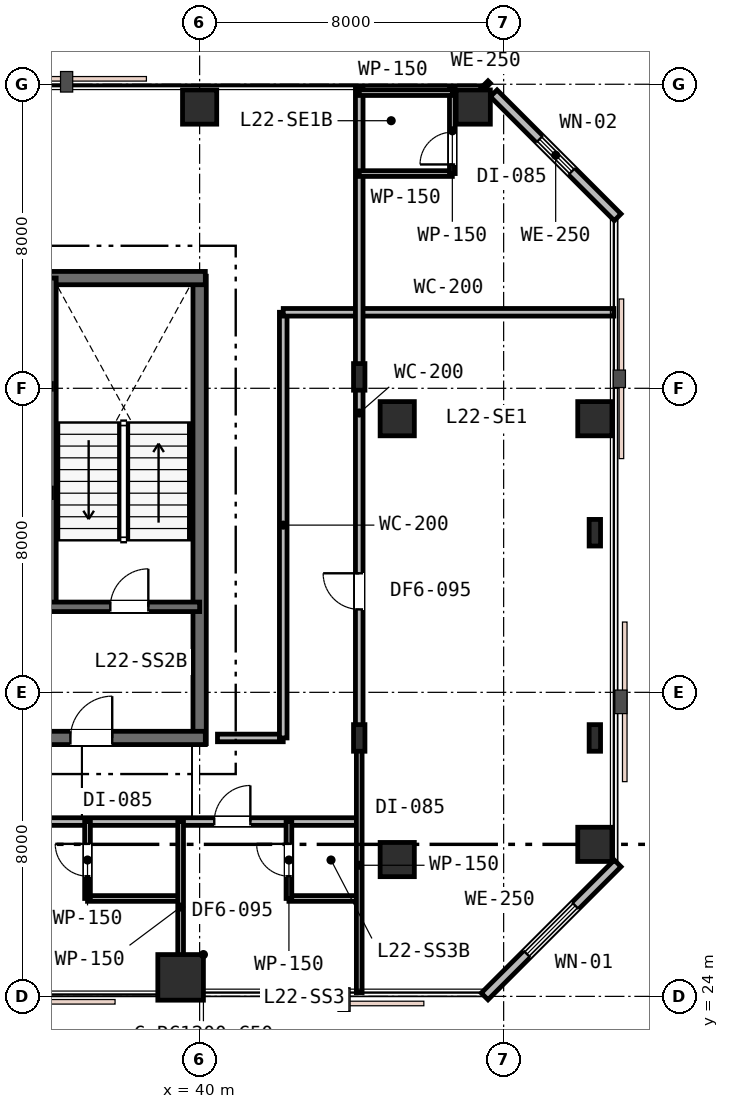
"""IFC4 building model, lengths in metres.
Left out: names, types, materials, properties, quantities, classifications, styles, units other than length and angle.
Written with IfcOpenShell. Run it as: python <this file> out.ifc"""

import sys

from ifc_helpers import new_model, si_unit, direction, frame, frame_2d, origin, origin_2d, place, context, subcontext, project, spatial, rectangle, i_section, extrude, element, fill, save


model = new_model("IFC4")
c1 = context("Model", 3, precision=1e-05, world=origin(), true_north=direction((0.0, 1.0)))
c2 = subcontext(c1, "Body", "Model", "MODEL_VIEW")
j1 = project(units=[si_unit("LENGTHUNIT", "METRE"), si_unit("PLANEANGLEUNIT", "RADIAN")], contexts=[c1])
p1 = place(None, origin())
s1 = spatial("IfcSite", under=j1, at=p1, CompositionType="ELEMENT")
p2 = place(p1, origin())
s2 = spatial("IfcBuilding", under=s1, at=p2, CompositionType="ELEMENT")
p3 = place(p2, frame((0.0, 0.0, 90.0)))
s3 = spatial("IfcBuildingStorey", under=s2, at=p3, CompositionType="ELEMENT", Elevation=90.0)
p4 = place(p3, frame((40.0, 30.65, 0.0), z_axis=(0.0, 0.0, 1.0), x_axis=(0.0, 1.0, 0.0)))
e1 = element("IfcWall", 1, at=p4, inside=s3, PredefinedType="SHEAR", context=c2, shape_type="SweptSolid", body=[
    extrude(rectangle(XDim=12.3, YDim=0.35, at=frame_2d((6.15, 0.0))), origin(), (0.0, 0.0, 1.0), 3.6),
])
p5 = place(p3, frame((15.85, 42.9, 0.0), z_axis=(0.0, 0.0, 1.0), x_axis=(1.0, 0.0, 0.0)))
e2 = element("IfcWall", 2, at=p5, inside=s3, PredefinedType="SHEAR", context=c2, shape_type="SweptSolid", body=[
    extrude(rectangle(XDim=24.3, YDim=0.35, at=frame_2d((12.15, 0.0))), origin(), (0.0, 0.0, 1.0), 3.6),
])
p6 = place(p3, frame((28.95, 30.8, 0.0), z_axis=(0.0, 0.0, 1.0), x_axis=(1.0, 0.0, 0.0)))
e3 = element("IfcWall", 3, at=p6, inside=s3, PredefinedType="SHEAR", context=c2, shape_type="SweptSolid", body=[
    extrude(rectangle(XDim=11.2, YDim=0.35, at=frame_2d((5.6, 0.0))), origin(), (0.0, 0.0, 1.0), 3.6),
])
p7 = place(p6, frame((7.65, 0.0, 0.0)))
e4 = element("IfcOpeningElement", 4, at=p7, cuts=e3, PredefinedType="OPENING", context=c2, shape_type="SweptSolid", body=[
    extrude(rectangle(XDim=1.1, YDim=2.15, at=frame_2d((0.55, 1.075))), frame((0.0, 0.185, 0.0), z_axis=(0.0, -1.0, 0.0), x_axis=(1.0, 0.0, 0.0)), (0.0, 0.0, 1.0), 0.37),
])
p8 = place(p3, frame((36.1, 34.25, 0.0), z_axis=(0.0, 0.0, 1.0), x_axis=(0.0, 1.0, 0.0)))
e5 = element("IfcWall", 5, at=p8, inside=s3, PredefinedType="SHEAR", context=c2, shape_type="SweptSolid", body=[
    extrude(rectangle(XDim=8.65, YDim=0.25, at=frame_2d((4.325, 0.0))), origin(), (0.0, 0.0, 1.0), 3.6),
])
p9 = place(p3, frame((33.95, 34.25, 0.0), z_axis=(0.0, 0.0, 1.0), x_axis=(1.0, 0.0, 0.0)))
e6 = element("IfcWall", 6, at=p9, inside=s3, PredefinedType="SHEAR", context=c2, shape_type="SweptSolid", body=[
    extrude(rectangle(XDim=6.05, YDim=0.25, at=frame_2d((3.025, 0.0))), origin(), (0.0, 0.0, 1.0), 3.6),
])
p10 = place(p9, frame((3.7, 0.0, 0.0)))
e7 = element("IfcOpeningElement", 7, at=p10, cuts=e6, PredefinedType="OPENING", context=c2, shape_type="SweptSolid", body=[
    extrude(rectangle(XDim=1.0, YDim=2.15, at=frame_2d((0.5, 1.075))), frame((0.0, 0.135, 0.0), z_axis=(0.0, -1.0, 0.0), x_axis=(1.0, 0.0, 0.0)), (0.0, 0.0, 1.0), 0.27),
])
p11 = place(p9, frame((0.55, 0.0, 0.0)))
e8 = element("IfcOpeningElement", 8, at=p11, cuts=e6, PredefinedType="OPENING", context=c2, shape_type="SweptSolid", body=[
    extrude(rectangle(XDim=1.1, YDim=2.15, at=frame_2d((0.55, 1.075))), frame((0.0, 0.135, 0.0), z_axis=(0.0, -1.0, 0.0), x_axis=(1.0, 0.0, 0.0)), (0.0, 0.0, 1.0), 0.27),
])
p12 = place(p3, frame((39.5, 24.5, 0.0), z_axis=(0.0, 0.0, 1.0), x_axis=(1.0, 0.0, 0.0)))
e9 = element("IfcColumn", 9, at=p12, inside=s3, PredefinedType="COLUMN", context=c2, shape_type="SweptSolid", body=[
    extrude(rectangle(XDim=1.2, YDim=1.2, at=origin_2d()), origin(), (0.0, 0.0, 1.0), 3.6),
])
for number, where, z_axis, x_axis in (
    (10, (45.2, 27.6, 0.0), (0.0, 0.0, 1.0), (1.0, 0.0, 0.0)),
    (11, (45.2, 39.2, 0.0), (0.0, 0.0, 1.0), (1.0, 0.0, 0.0)),
    (12, (40.0, 47.4, 0.0), (0.0, 0.0, 1.0), (1.0, 0.0, 0.0)),
    (13, (47.2, 47.4, 0.0), (0.0, 0.0, 1.0), (1.0, 0.0, 0.0)),
    (14, (50.4, 28.0, 0.0), (0.0, 0.0, 1.0), (1.0, 0.0, 0.0)),
    (15, (50.4, 39.2, 0.0), (0.0, 0.0, 1.0), (1.0, 0.0, 0.0)),
):
    element("IfcColumn", number, at=place(p3, frame(where, z_axis=z_axis, x_axis=x_axis)), inside=s3, PredefinedType="COLUMN", context=c2, shape_type="SweptSolid", body=[
        extrude(rectangle(XDim=0.9, YDim=0.9, at=origin_2d()), origin(), (0.0, 0.0, 1.0), 3.6),
    ])
for number, where, z_axis, x_axis in (
    (16, (44.2, 30.8, 0.0), (0.0, 0.0, 1.0), (1.0, 0.0, 0.0)),
    (17, (44.2, 40.3, 0.0), (0.0, 0.0, 1.0), (1.0, 0.0, 0.0)),
    (18, (50.4, 30.8, 0.0), (0.0, 0.0, 1.0), (1.0, 0.0, 0.0)),
    (19, (50.4, 36.2, 0.0), (0.0, 0.0, 1.0), (1.0, 0.0, 0.0)),
):
    element("IfcColumn", number, at=place(p3, frame(where, z_axis=z_axis, x_axis=x_axis)), inside=s3, PredefinedType="COLUMN", context=c2, shape_type="SweptSolid", body=[
        extrude(i_section(OverallWidth=0.3, OverallDepth=0.7, WebThickness=0.017, FlangeThickness=0.032, FilletRadius=0.027, at=origin_2d()), origin(), (0.0, 0.0, 1.0), 3.6),
    ])
p13 = place(p3, frame((47.5, 24.0, 0.0), z_axis=(0.0, 0.0, 1.0), x_axis=(0.707106781187, 0.707106781187, 0.0)))
e20 = element("IfcWall", 20, at=p13, inside=s3, PredefinedType="STANDARD", context=c2, shape_type="SweptSolid", body=[
    extrude(rectangle(XDim=4.95, YDim=0.25, at=frame_2d((2.475, 0.0))), origin(), (0.0, 0.0, 1.0), 3.33),
])
p14 = place(p13, frame((1.575, 0.0, 0.75)))
e21 = element("IfcOpeningElement", 21, at=p14, cuts=e20, PredefinedType="OPENING", context=c2, shape_type="SweptSolid", body=[
    extrude(rectangle(XDim=1.8, YDim=1.85, at=frame_2d((0.9, 0.925))), frame((0.0, 0.135, 0.0), z_axis=(0.0, -1.0, 0.0), x_axis=(1.0, 0.0, 0.0)), (0.0, 0.0, 1.0), 0.27),
])
p15 = place(p3, frame((51.0, 44.5, 0.0), z_axis=(0.0, 0.0, 1.0), x_axis=(-0.707106781187, 0.707106781187, 0.0)))
e22 = element("IfcWall", 22, at=p15, inside=s3, PredefinedType="STANDARD", context=c2, shape_type="SweptSolid", body=[
    extrude(rectangle(XDim=4.613, YDim=0.25, at=frame_2d((2.306, 0.0))), origin(), (0.0, 0.0, 1.0), 3.33),
])
p16 = place(p15, frame((1.706, 0.0, 0.85)))
e23 = element("IfcOpeningElement", 23, at=p16, cuts=e22, PredefinedType="OPENING", context=c2, shape_type="SweptSolid", body=[
    extrude(rectangle(XDim=1.2, YDim=1.6, at=frame_2d((0.6, 0.8))), frame((0.0, 0.135, 0.0), z_axis=(0.0, -1.0, 0.0), x_axis=(1.0, 0.0, 0.0)), (0.0, 0.0, 1.0), 0.27),
])
p17 = place(p3, frame((47.562, 47.938, 0.0), z_axis=(0.0, 0.0, 1.0), x_axis=(-0.707106781187, 0.707106781187, 0.0)))
e24 = element("IfcWall", 24, at=p17, inside=s3, PredefinedType="STANDARD", context=c2, shape_type="SweptSolid", body=[
    extrude(rectangle(XDim=0.087, YDim=0.25, at=frame_2d((0.044, 0.0))), origin(), (0.0, 0.0, 1.0), 3.33),
])
p18 = place(p3, frame((11.4, 28.6, 0.0), z_axis=(0.0, 0.0, 1.0), x_axis=(1.0, 0.0, 0.0)))
e25 = element("IfcWall", 25, at=p18, inside=s3, PredefinedType="PARTITIONING", context=c2, shape_type="SweptSolid", body=[
    extrude(rectangle(XDim=32.8, YDim=0.2, at=frame_2d((16.4, 0.0))), origin(), (0.0, 0.0, 1.0), 2.83),
])
p19 = place(p18, frame((14.7, 0.0, 0.0)))
e26 = element("IfcOpeningElement", 26, at=p19, cuts=e25, PredefinedType="OPENING", context=c2, shape_type="SweptSolid", body=[
    extrude(rectangle(XDim=0.95, YDim=2.15, at=frame_2d((0.475, 1.075))), frame((0.0, 0.11, 0.0), z_axis=(0.0, -1.0, 0.0), x_axis=(1.0, 0.0, 0.0)), (0.0, 0.0, 1.0), 0.22),
])
p20 = place(p18, frame((22.475, 0.0, 0.0)))
e27 = element("IfcOpeningElement", 27, at=p20, cuts=e25, PredefinedType="OPENING", context=c2, shape_type="SweptSolid", body=[
    extrude(rectangle(XDim=0.95, YDim=2.15, at=frame_2d((0.475, 1.075))), frame((0.0, 0.11, 0.0), z_axis=(0.0, -1.0, 0.0), x_axis=(1.0, 0.0, 0.0)), (0.0, 0.0, 1.0), 0.22),
])
p21 = place(p18, frame((28.985, 0.0, 0.0)))
e28 = element("IfcOpeningElement", 28, at=p21, cuts=e25, PredefinedType="OPENING", context=c2, shape_type="SweptSolid", body=[
    extrude(rectangle(XDim=0.95, YDim=2.15, at=frame_2d((0.475, 1.075))), frame((0.0, 0.11, 0.0), z_axis=(0.0, -1.0, 0.0), x_axis=(1.0, 0.0, 0.0)), (0.0, 0.0, 1.0), 0.22),
])
p22 = place(p3, frame((40.47, 30.8, 0.0), z_axis=(0.0, 0.0, 1.0), x_axis=(1.0, 0.0, 0.0)))
e29 = element("IfcWall", 29, at=p22, inside=s3, PredefinedType="PARTITIONING", context=c2, shape_type="SweptSolid", body=[
    extrude(rectangle(XDim=1.73, YDim=0.2, at=frame_2d((0.865, 0.0))), origin(), (0.0, 0.0, 1.0), 2.83),
])
p23 = place(p3, frame((42.2, 30.8, 0.0), z_axis=(0.0, 0.0, 1.0), x_axis=(0.0, 1.0, 0.0)))
e30 = element("IfcWall", 30, at=p23, inside=s3, PredefinedType="PARTITIONING", context=c2, shape_type="SweptSolid", body=[
    extrude(rectangle(XDim=11.2, YDim=0.2, at=frame_2d((5.6, 0.0))), origin(), (0.0, 0.0, 1.0), 2.83),
])
p24 = place(p3, frame((42.2, 42.0, 0.0), z_axis=(0.0, 0.0, 1.0), x_axis=(1.0, 0.0, 0.0)))
e31 = element("IfcWall", 31, at=p24, inside=s3, PredefinedType="PARTITIONING", context=c2, shape_type="SweptSolid", body=[
    extrude(rectangle(XDim=8.7, YDim=0.2, at=frame_2d((4.35, 0.0))), origin(), (0.0, 0.0, 1.0), 3.33),
])
p25 = place(p3, frame((37.05, 26.576, 0.0), z_axis=(0.0, 0.0, 1.0), x_axis=(1.0, 0.0, 0.0)))
e32 = element("IfcWall", 32, at=p25, inside=s3, PredefinedType="PARTITIONING", context=c2, shape_type="SweptSolid", body=[
    extrude(rectangle(XDim=2.45, YDim=0.15, at=frame_2d((1.225, 0.0))), origin(), (0.0, 0.0, 1.0), 2.83),
])
p26 = place(p3, frame((37.05, 26.576, 0.0), z_axis=(0.0, 0.0, 1.0), x_axis=(0.0, 1.0, 0.0)))
e33 = element("IfcWall", 33, at=p26, inside=s3, PredefinedType="PARTITIONING", context=c2, shape_type="SweptSolid", body=[
    extrude(rectangle(XDim=2.024, YDim=0.15, at=frame_2d((1.012, 0.0))), origin(), (0.0, 0.0, 1.0), 3.02),
])
p27 = place(p26, frame((0.587, 0.0, 0.0)))
e34 = element("IfcOpeningElement", 34, at=p27, cuts=e33, PredefinedType="OPENING", context=c2, shape_type="SweptSolid", body=[
    extrude(rectangle(XDim=0.85, YDim=2.15, at=frame_2d((0.425, 1.075))), frame((0.0, 0.085, 0.0), z_axis=(0.0, -1.0, 0.0), x_axis=(1.0, 0.0, 0.0)), (0.0, 0.0, 1.0), 0.17),
])
p28 = place(p3, frame((39.5, 28.6, 0.0), z_axis=(0.0, 0.0, 1.0), x_axis=(0.0, -1.0, 0.0)))
e35 = element("IfcWall", 35, at=p28, inside=s3, PredefinedType="PARTITIONING", context=c2, shape_type="SweptSolid", body=[
    extrude(rectangle(XDim=4.5, YDim=0.15, at=frame_2d((2.25, 0.0))), origin(), (0.0, 0.0, 1.0), 2.83),
])
p29 = place(p3, frame((42.35, 26.576, 0.0), z_axis=(0.0, 0.0, 1.0), x_axis=(1.0, 0.0, 0.0)))
e36 = element("IfcWall", 36, at=p29, inside=s3, PredefinedType="PARTITIONING", context=c2, shape_type="SweptSolid", body=[
    extrude(rectangle(XDim=1.85, YDim=0.15, at=frame_2d((0.925, 0.0))), origin(), (0.0, 0.0, 1.0), 3.33),
])
p30 = place(p3, frame((42.35, 26.576, 0.0), z_axis=(0.0, 0.0, 1.0), x_axis=(0.0, 1.0, 0.0)))
e37 = element("IfcWall", 37, at=p30, inside=s3, PredefinedType="PARTITIONING", context=c2, shape_type="SweptSolid", body=[
    extrude(rectangle(XDim=2.024, YDim=0.15, at=frame_2d((1.012, 0.0))), origin(), (0.0, 0.0, 1.0), 3.33),
])
p31 = place(p30, frame((0.587, 0.0, 0.0)))
e38 = element("IfcOpeningElement", 38, at=p31, cuts=e37, PredefinedType="OPENING", context=c2, shape_type="SweptSolid", body=[
    extrude(rectangle(XDim=0.85, YDim=2.15, at=frame_2d((0.425, 1.075))), frame((0.0, 0.085, 0.0), z_axis=(0.0, -1.0, 0.0), x_axis=(1.0, 0.0, 0.0)), (0.0, 0.0, 1.0), 0.17),
])
p32 = place(p3, frame((44.2, 30.8, 0.0), z_axis=(0.0, 0.0, 1.0), x_axis=(0.0, -1.0, 0.0)))
e39 = element("IfcWall", 39, at=p32, inside=s3, PredefinedType="PARTITIONING", context=c2, shape_type="SweptSolid", body=[
    extrude(rectangle(XDim=6.7, YDim=0.15, at=frame_2d((3.35, 0.0))), origin(), (0.0, 0.0, 1.0), 2.83),
])
p33 = place(p3, frame((44.2, 30.8, 0.0), z_axis=(0.0, 0.0, 1.0), x_axis=(0.0, 1.0, 0.0)))
e40 = element("IfcWall", 40, at=p33, inside=s3, PredefinedType="PARTITIONING", context=c2, shape_type="SweptSolid", body=[
    extrude(rectangle(XDim=17.1, YDim=0.2, at=frame_2d((8.55, 0.0))), origin(), (0.0, 0.0, 1.0), 2.83),
])
p34 = place(p33, frame((3.382, 0.0, 0.0)))
e41 = element("IfcOpeningElement", 41, at=p34, cuts=e40, PredefinedType="OPENING", context=c2, shape_type="SweptSolid", body=[
    extrude(rectangle(XDim=0.95, YDim=2.15, at=frame_2d((0.475, 1.075))), frame((0.0, 0.11, 0.0), z_axis=(0.0, -1.0, 0.0), x_axis=(1.0, 0.0, 0.0)), (0.0, 0.0, 1.0), 0.22),
])
p35 = place(p3, frame((44.2, 45.65, 0.0), z_axis=(0.0, 0.0, 1.0), x_axis=(1.0, 0.0, 0.0)))
e42 = element("IfcWall", 42, at=p35, inside=s3, PredefinedType="PARTITIONING", context=c2, shape_type="SweptSolid", body=[
    extrude(rectangle(XDim=2.45, YDim=0.15, at=frame_2d((1.225, 0.0))), origin(), (0.0, 0.0, 1.0), 3.33),
])
p36 = place(p3, frame((46.65, 45.65, 0.0), z_axis=(0.0, 0.0, 1.0), x_axis=(0.0, 1.0, 0.0)))
e43 = element("IfcWall", 43, at=p36, inside=s3, PredefinedType="PARTITIONING", context=c2, shape_type="SweptSolid", body=[
    extrude(rectangle(XDim=2.25, YDim=0.15, at=frame_2d((1.125, 0.0))), origin(), (0.0, 0.0, 1.0), 2.92),
])
p37 = place(p36, frame((0.24, 0.0, 0.0)))
e44 = element("IfcOpeningElement", 44, at=p37, cuts=e43, PredefinedType="OPENING", context=c2, shape_type="SweptSolid", body=[
    extrude(rectangle(XDim=0.85, YDim=2.15, at=frame_2d((0.425, 1.075))), frame((0.0, 0.085, 0.0), z_axis=(0.0, -1.0, 0.0), x_axis=(1.0, 0.0, 0.0)), (0.0, 0.0, 1.0), 0.17),
])
p38 = place(p3, frame((44.2, 47.78, 0.0), z_axis=(0.0, 0.0, 1.0), x_axis=(1.0, 0.0, 0.0)))
e45 = element("IfcWall", 45, at=p38, inside=s3, PredefinedType="PARTITIONING", context=c2, shape_type="SweptSolid", body=[
    extrude(rectangle(XDim=2.45, YDim=0.15, at=frame_2d((1.225, 0.0))), origin(), (0.0, 0.0, 1.0), 2.92),
])
p39 = place(p14, origin())
e46 = element("IfcWindow", 46, at=p39, inside=s3, PartitioningType="SINGLE_PANEL", PredefinedType="WINDOW", context=c2, shape_type="SweptSolid", body=[
    extrude(rectangle(XDim=1.8, YDim=1.85, at=frame_2d((0.9, 0.925))), frame((0.0, 0.03, 0.0), z_axis=(0.0, -1.0, 0.0), x_axis=(1.0, 0.0, 0.0)), (0.0, 0.0, 1.0), 0.06),
])
fill(e21, e46)
p40 = place(p16, origin())
e47 = element("IfcWindow", 47, at=p40, inside=s3, PartitioningType="SINGLE_PANEL", PredefinedType="WINDOW", context=c2, shape_type="SweptSolid", body=[
    extrude(rectangle(XDim=1.2, YDim=1.6, at=frame_2d((0.6, 0.8))), frame((0.0, 0.03, 0.0), z_axis=(0.0, -1.0, 0.0), x_axis=(1.0, 0.0, 0.0)), (0.0, 0.0, 1.0), 0.06),
])
fill(e23, e47)
p41 = place(p10, origin())
e48 = element("IfcDoor", 48, at=p41, inside=s3, OperationType="SINGLE_SWING_RIGHT", PredefinedType="DOOR", context=c2, shape_type="SweptSolid", body=[
    extrude(rectangle(XDim=1.0, YDim=2.15, at=frame_2d((0.5, 1.075))), frame((0.0, 0.025, 0.0), z_axis=(0.0, -1.0, 0.0), x_axis=(1.0, 0.0, 0.0)), (0.0, 0.0, 1.0), 0.05),
])
fill(e7, e48)
p42 = place(p7, origin())
e49 = element("IfcDoor", 49, at=p42, inside=s3, OperationType="SINGLE_SWING_RIGHT", PredefinedType="DOOR", context=c2, shape_type="SweptSolid", body=[
    extrude(rectangle(XDim=1.1, YDim=2.15, at=frame_2d((0.55, 1.075))), frame((0.0, 0.025, 0.0), z_axis=(0.0, -1.0, 0.0), x_axis=(1.0, 0.0, 0.0)), (0.0, 0.0, 1.0), 0.05),
])
fill(e4, e49)
p43 = place(p27, origin())
e50 = element("IfcDoor", 50, at=p43, inside=s3, OperationType="SINGLE_SWING_RIGHT", PredefinedType="DOOR", context=c2, shape_type="SweptSolid", body=[
    extrude(rectangle(XDim=0.85, YDim=2.15, at=frame_2d((0.425, 1.075))), frame((0.0, 0.025, 0.0), z_axis=(0.0, -1.0, 0.0), x_axis=(1.0, 0.0, 0.0)), (0.0, 0.0, 1.0), 0.05),
])
fill(e34, e50)
p44 = place(p21, origin())
e51 = element("IfcDoor", 51, at=p44, inside=s3, OperationType="SINGLE_SWING_RIGHT", PredefinedType="DOOR", context=c2, shape_type="SweptSolid", body=[
    extrude(rectangle(XDim=0.95, YDim=2.15, at=frame_2d((0.475, 1.075))), frame((0.0, 0.025, 0.0), z_axis=(0.0, -1.0, 0.0), x_axis=(1.0, 0.0, 0.0)), (0.0, 0.0, 1.0), 0.05),
])
fill(e28, e51)
p45 = place(p31, origin())
e52 = element("IfcDoor", 52, at=p45, inside=s3, OperationType="SINGLE_SWING_RIGHT", PredefinedType="DOOR", context=c2, shape_type="SweptSolid", body=[
    extrude(rectangle(XDim=0.85, YDim=2.15, at=frame_2d((0.425, 1.075))), frame((0.0, 0.025, 0.0), z_axis=(0.0, -1.0, 0.0), x_axis=(1.0, 0.0, 0.0)), (0.0, 0.0, 1.0), 0.05),
])
fill(e38, e52)
p46 = place(p34, origin())
e53 = element("IfcDoor", 53, at=p46, inside=s3, OperationType="SINGLE_SWING_RIGHT", PredefinedType="DOOR", context=c2, shape_type="SweptSolid", body=[
    extrude(rectangle(XDim=0.95, YDim=2.15, at=frame_2d((0.475, 1.075))), frame((0.0, 0.025, 0.0), z_axis=(0.0, -1.0, 0.0), x_axis=(1.0, 0.0, 0.0)), (0.0, 0.0, 1.0), 0.05),
])
fill(e41, e53)
p47 = place(p37, origin())
e54 = element("IfcDoor", 54, at=p47, inside=s3, OperationType="SINGLE_SWING_LEFT", PredefinedType="DOOR", context=c2, shape_type="SweptSolid", body=[
    extrude(rectangle(XDim=0.85, YDim=2.15, at=frame_2d((0.425, 1.075))), frame((0.0, 0.025, 0.0), z_axis=(0.0, -1.0, 0.0), x_axis=(1.0, 0.0, 0.0)), (0.0, 0.0, 1.0), 0.05),
])
fill(e44, e54)
save(model, sys.argv[1])
